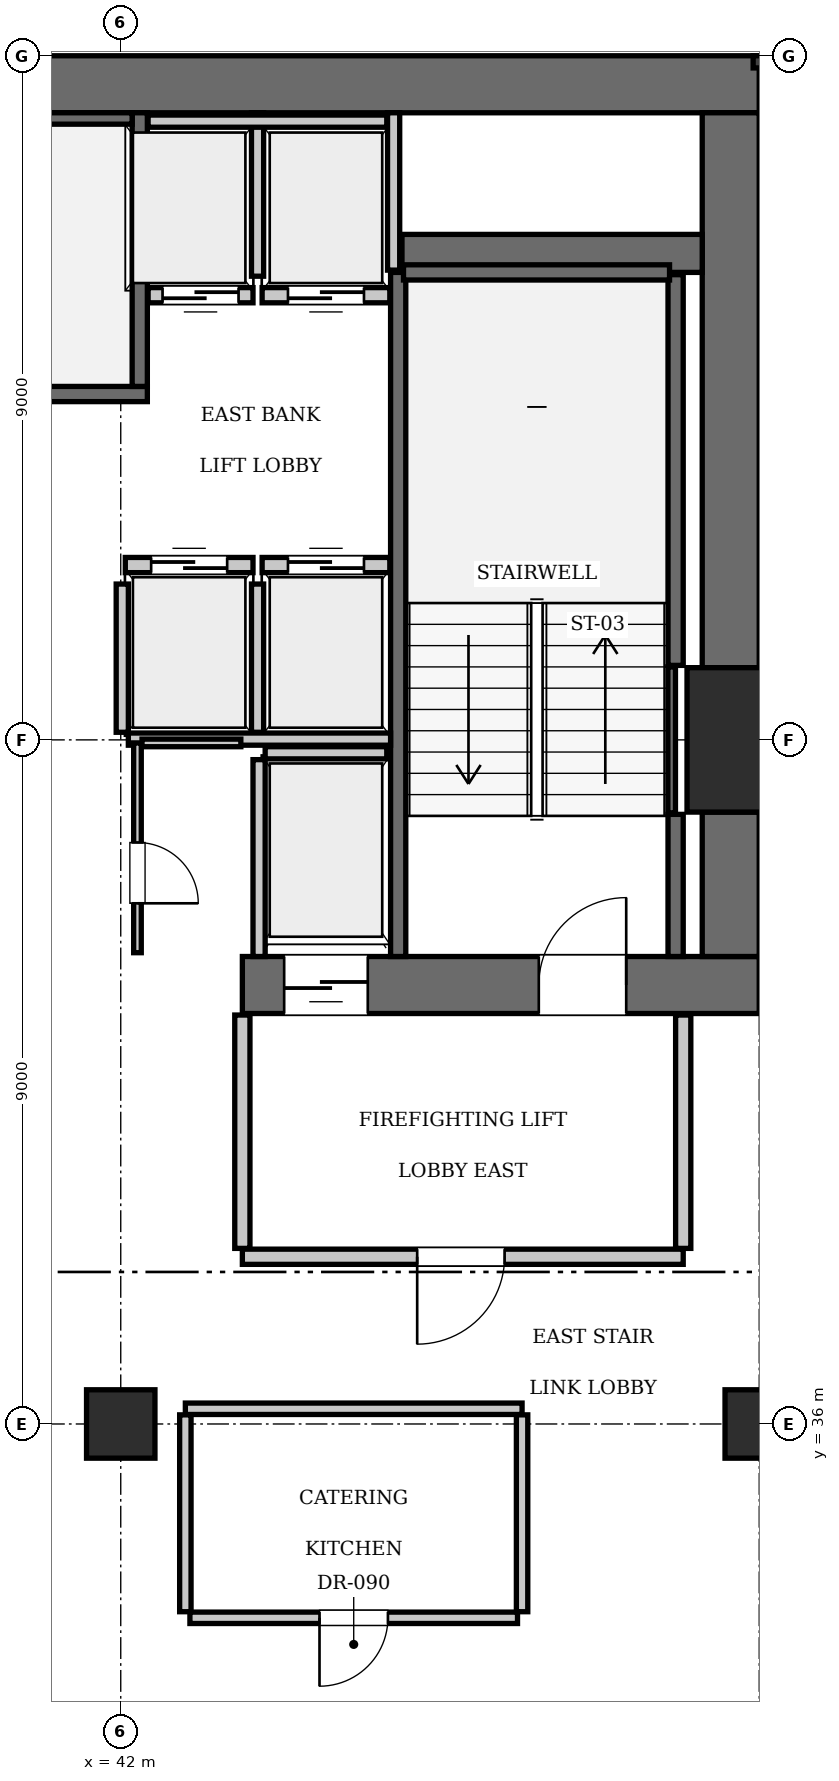
"""IFC4 building model, lengths in metres.
Left out: names, types, materials, properties, quantities, classifications, styles, units other than length and angle.
Written with IfcOpenShell. Run it as: python <this file> out.ifc"""

import sys

from ifc_helpers import new_model, si_unit, direction, frame, frame_2d, origin, origin_2d, place, context, subcontext, project, spatial, rectangle, extrude, element, fill, save


model = new_model("IFC4")
c1 = context("Model", 3, precision=1e-05, world=origin(), true_north=direction((0.0, 1.0)))
c2 = subcontext(c1, "Body", "Model", "MODEL_VIEW")
j1 = project(units=[si_unit("LENGTHUNIT", "METRE"), si_unit("PLANEANGLEUNIT", "RADIAN")], contexts=[c1])
p1 = place(None, origin())
s1 = spatial("IfcSite", under=j1, at=p1, CompositionType="ELEMENT")
p2 = place(p1, origin())
s2 = spatial("IfcBuilding", under=s1, at=p2, CompositionType="ELEMENT")
p3 = place(p2, frame((0.0, 0.0, 215.95)))
s3 = spatial("IfcBuildingStorey", under=s2, at=p3, CompositionType="ELEMENT", Elevation=215.95)
p4 = place(p3, frame((50.4, 45.0, 0.0), z_axis=(0.0, 0.0, 1.0), x_axis=(1.0, 0.0, 0.0)))
e1 = element("IfcColumn", 1, at=p4, inside=s3, PredefinedType="COLUMN", context=c2, shape_type="SweptSolid", body=[
    extrude(rectangle(XDim=1.9, YDim=1.9, at=origin_2d()), origin(), (0.0, 0.0, 1.0), 3.85),
])
p5 = place(p3, frame((25.2, 53.625, 0.0), z_axis=(0.0, 0.0, 1.0), x_axis=(1.0, 0.0, 0.0)))
e2 = element("IfcWall", 2, at=p5, inside=s3, PredefinedType="SHEAR", context=c2, shape_type="SweptSolid", body=[
    extrude(rectangle(XDim=25.2, YDim=0.75, at=frame_2d((12.6, 0.0))), origin(), (0.0, 0.0, 1.0), 3.85),
])
p6 = place(p3, frame((43.6, 41.775, 0.0), z_axis=(0.0, 0.0, 1.0), x_axis=(1.0, 0.0, 0.0)))
e3 = element("IfcWall", 3, at=p6, inside=s3, PredefinedType="SHEAR", context=c2, shape_type="SweptSolid", body=[
    extrude(rectangle(XDim=6.8, YDim=0.75, at=frame_2d((3.4, 0.0))), origin(), (0.0, 0.0, 1.0), 3.85),
])
p7 = place(p6, frame((3.9, 0.0, 0.0)))
e4 = element("IfcOpeningElement", 4, at=p7, cuts=e3, PredefinedType="OPENING", context=c2, shape_type="SweptSolid", body=[
    extrude(rectangle(XDim=1.15, YDim=2.15, at=frame_2d((0.575, 1.075))), frame((0.0, 0.385, 0.0), z_axis=(0.0, -1.0, 0.0), x_axis=(1.0, 0.0, 0.0)), (0.0, 0.0, 1.0), 0.77),
])
p8 = place(p6, frame((0.55, 0.0, 0.0)))
e5 = element("IfcOpeningElement", 5, at=p8, cuts=e3, PredefinedType="OPENING", context=c2, shape_type="SweptSolid", body=[
    extrude(rectangle(XDim=1.1, YDim=2.2, at=frame_2d((0.55, 1.1))), frame((0.0, 0.385, 0.0), z_axis=(0.0, -1.0, 0.0), x_axis=(1.0, 0.0, 0.0)), (0.0, 0.0, 1.0), 0.77),
])
p9 = place(p3, frame((50.025, 42.15, 0.0), z_axis=(0.0, 0.0, 1.0), x_axis=(0.0, 1.0, 0.0)))
e6 = element("IfcWall", 6, at=p9, inside=s3, PredefinedType="SHEAR", context=c2, shape_type="SweptSolid", body=[
    extrude(rectangle(XDim=1.9, YDim=0.75, at=frame_2d((0.95, 0.0))), origin(), (0.0, 0.0, 1.0), 3.85),
])
p10 = place(p3, frame((50.025, 45.95, 0.0), z_axis=(0.0, 0.0, 1.0), x_axis=(0.0, 1.0, 0.0)))
e7 = element("IfcWall", 7, at=p10, inside=s3, PredefinedType="SHEAR", context=c2, shape_type="SweptSolid", body=[
    extrude(rectangle(XDim=7.3, YDim=0.75, at=frame_2d((3.65, 0.0))), origin(), (0.0, 0.0, 1.0), 3.85),
])
p11 = place(p3, frame((45.7, 51.4, 0.0), z_axis=(0.0, 0.0, 1.0), x_axis=(1.0, 0.0, 0.0)))
e8 = element("IfcWall", 8, at=p11, inside=s3, PredefinedType="SHEAR", context=c2, shape_type="SweptSolid", body=[
    extrude(rectangle(XDim=3.95, YDim=0.5, at=frame_2d((1.975, 0.0))), origin(), (0.0, 0.0, 1.0), 3.85),
])
for number, where, z_axis, x_axis in (
    (9, (42.0, 36.0, 0.0), (0.0, 0.0, 1.0), (1.0, 0.0, 0.0)),
    (10, (50.4, 36.0, 0.0), (0.0, 0.0, 1.0), (1.0, 0.0, 0.0)),
):
    element("IfcColumn", number, at=place(p3, frame(where, z_axis=z_axis, x_axis=x_axis)), inside=s3, PredefinedType="COLUMN", context=c2, shape_type="SweptSolid", body=[
        extrude(rectangle(XDim=0.9, YDim=0.9, at=origin_2d()), origin(), (0.0, 0.0, 1.0), 3.85),
    ])
p12 = place(p3, frame((33.25, 49.55, 0.0), z_axis=(0.0, 0.0, 1.0), x_axis=(1.0, 0.0, 0.0)))
e11 = element("IfcWall", 11, at=p12, inside=s3, PredefinedType="SOLIDWALL", context=c2, shape_type="SweptSolid", body=[
    extrude(rectangle(XDim=9.1, YDim=0.2, at=frame_2d((4.55, 0.0))), origin(), (0.0, 0.0, 1.0), 3.61),
])
p13 = place(p3, frame((42.25, 49.65, 0.0), z_axis=(0.0, 0.0, 1.0), x_axis=(0.0, 1.0, 0.0)))
e12 = element("IfcWall", 12, at=p13, inside=s3, PredefinedType="SOLIDWALL", context=c2, shape_type="SweptSolid", body=[
    extrude(rectangle(XDim=3.6, YDim=0.2, at=frame_2d((1.8, 0.0))), origin(), (0.0, 0.0, 1.0), 3.61),
])
p14 = place(p3, frame((33.45, 53.175, 0.0), z_axis=(0.0, 0.0, 1.0), x_axis=(1.0, 0.0, 0.0)))
e13 = element("IfcWall", 13, at=p14, inside=s3, PredefinedType="SOLIDWALL", context=c2, shape_type="SweptSolid", body=[
    extrude(rectangle(XDim=8.7, YDim=0.15, at=frame_2d((4.35, 0.0))), origin(), (0.0, 0.0, 1.0), 3.61),
])
p15 = place(p3, frame((45.65, 42.15, 0.0), z_axis=(0.0, 0.0, 1.0), x_axis=(0.0, 1.0, 0.0)))
e14 = element("IfcWall", 14, at=p15, inside=s3, PredefinedType="SOLIDWALL", context=c2, shape_type="SweptSolid", body=[
    extrude(rectangle(XDim=9.0, YDim=0.2, at=frame_2d((4.5, 0.0))), origin(), (0.0, 0.0, 1.0), 3.61),
])
p16 = place(p3, frame((49.3, 42.15, 0.0), z_axis=(0.0, 0.0, 1.0), x_axis=(0.0, 1.0, 0.0)))
e15 = element("IfcWall", 15, at=p16, inside=s3, PredefinedType="SOLIDWALL", context=c2, shape_type="SweptSolid", body=[
    extrude(rectangle(XDim=1.87, YDim=0.2, at=frame_2d((0.935, 0.0))), origin(), (0.0, 0.0, 1.0), 3.61),
])
p17 = place(p3, frame((49.3, 45.98, 0.0), z_axis=(0.0, 0.0, 1.0), x_axis=(0.0, 1.0, 0.0)))
e16 = element("IfcWall", 16, at=p17, inside=s3, PredefinedType="SOLIDWALL", context=c2, shape_type="SweptSolid", body=[
    extrude(rectangle(XDim=5.14, YDim=0.2, at=frame_2d((2.57, 0.0))), origin(), (0.0, 0.0, 1.0), 3.61),
])
p18 = place(p3, frame((45.72, 51.15, 0.0), z_axis=(0.0, 0.0, 1.0), x_axis=(1.0, 0.0, 0.0)))
e17 = element("IfcWall", 17, at=p18, inside=s3, PredefinedType="SOLIDWALL", context=c2, shape_type="SweptSolid", body=[
    extrude(rectangle(XDim=3.5, YDim=0.2, at=frame_2d((1.75, 0.0))), origin(), (0.0, 0.0, 1.0), 3.61),
])
p19 = place(p3, frame((49.248, 44.04, 0.0), z_axis=(0.0, 0.0, 1.0), x_axis=(0.0, 1.0, 0.0)))
e18 = element("IfcWall", 18, at=p19, inside=s3, PredefinedType="SOLIDWALL", context=c2, shape_type="SweptSolid", body=[
    extrude(rectangle(XDim=1.92, YDim=0.1, at=frame_2d((0.96, 0.0))), origin(), (0.0, 0.0, 1.0), 3.61),
])
p20 = place(p3, frame((42.06, 47.3, 0.0), z_axis=(0.0, 0.0, 1.0), x_axis=(1.0, 0.0, 0.0)))
e19 = element("IfcWall", 19, at=p20, inside=s3, PredefinedType="SOLIDWALL", context=c2, shape_type="SweptSolid", body=[
    extrude(rectangle(XDim=1.68, YDim=0.2, at=frame_2d((0.84, 0.0))), origin(), (0.0, 0.0, 1.0), 3.61),
])
p21 = place(p20, frame((0.34, 0.0, 0.0)))
e20 = element("IfcOpeningElement", 20, at=p21, cuts=e19, PredefinedType="OPENING", context=c2, shape_type="SweptSolid", body=[
    extrude(rectangle(XDim=1.0, YDim=2.15, at=frame_2d((0.5, 1.075))), frame((0.0, 0.11, 0.0), z_axis=(0.0, -1.0, 0.0), x_axis=(1.0, 0.0, 0.0)), (0.0, 0.0, 1.0), 0.22),
])
p22 = place(p3, frame((43.86, 47.3, 0.0), z_axis=(0.0, 0.0, 1.0), x_axis=(1.0, 0.0, 0.0)))
e21 = element("IfcWall", 21, at=p22, inside=s3, PredefinedType="SOLIDWALL", context=c2, shape_type="SweptSolid", body=[
    extrude(rectangle(XDim=1.68, YDim=0.2, at=frame_2d((0.84, 0.0))), origin(), (0.0, 0.0, 1.0), 3.61),
])
p23 = place(p22, frame((0.34, 0.0, 0.0)))
e22 = element("IfcOpeningElement", 22, at=p23, cuts=e21, PredefinedType="OPENING", context=c2, shape_type="SweptSolid", body=[
    extrude(rectangle(XDim=1.0, YDim=2.15, at=frame_2d((0.5, 1.075))), frame((0.0, 0.11, 0.0), z_axis=(0.0, -1.0, 0.0), x_axis=(1.0, 0.0, 0.0)), (0.0, 0.0, 1.0), 0.22),
])
p24 = place(p3, frame((42.36, 50.85, 0.0), z_axis=(0.0, 0.0, 1.0), x_axis=(1.0, 0.0, 0.0)))
e23 = element("IfcWall", 23, at=p24, inside=s3, PredefinedType="SOLIDWALL", context=c2, shape_type="SweptSolid", body=[
    extrude(rectangle(XDim=1.38, YDim=0.2, at=frame_2d((0.69, 0.0))), origin(), (0.0, 0.0, 1.0), 3.61),
])
p25 = place(p24, frame((0.19, 0.0, 0.0)))
e24 = element("IfcOpeningElement", 24, at=p25, cuts=e23, PredefinedType="OPENING", context=c2, shape_type="SweptSolid", body=[
    extrude(rectangle(XDim=1.0, YDim=2.15, at=frame_2d((0.5, 1.075))), frame((0.0, 0.11, 0.0), z_axis=(0.0, -1.0, 0.0), x_axis=(1.0, 0.0, 0.0)), (0.0, 0.0, 1.0), 0.22),
])
p26 = place(p3, frame((43.86, 50.85, 0.0), z_axis=(0.0, 0.0, 1.0), x_axis=(1.0, 0.0, 0.0)))
e25 = element("IfcWall", 25, at=p26, inside=s3, PredefinedType="SOLIDWALL", context=c2, shape_type="SweptSolid", body=[
    extrude(rectangle(XDim=1.68, YDim=0.2, at=frame_2d((0.84, 0.0))), origin(), (0.0, 0.0, 1.0), 3.61),
])
p27 = place(p26, frame((0.34, 0.0, 0.0)))
e26 = element("IfcOpeningElement", 26, at=p27, cuts=e25, PredefinedType="OPENING", context=c2, shape_type="SweptSolid", body=[
    extrude(rectangle(XDim=1.0, YDim=2.15, at=frame_2d((0.5, 1.075))), frame((0.0, 0.11, 0.0), z_axis=(0.0, -1.0, 0.0), x_axis=(1.0, 0.0, 0.0)), (0.0, 0.0, 1.0), 0.22),
])
p28 = place(p3, frame((43.9, 44.83, 0.0), z_axis=(0.0, 0.0, 1.0), x_axis=(1.0, 0.0, 0.0)))
e27 = element("IfcWall", 27, at=p28, inside=s3, PredefinedType="SOLIDWALL", context=c2, shape_type="SweptSolid", body=[
    extrude(rectangle(XDim=1.6, YDim=0.16, at=frame_2d((0.8, 0.0))), origin(), (0.0, 0.0, 1.0), 3.61),
])
p29 = place(p3, frame((43.82, 42.15, 0.0), z_axis=(0.0, 0.0, 1.0), x_axis=(0.0, 1.0, 0.0)))
e28 = element("IfcWall", 28, at=p29, inside=s3, PredefinedType="SOLIDWALL", context=c2, shape_type="SweptSolid", body=[
    extrude(rectangle(XDim=2.59, YDim=0.16, at=frame_2d((1.295, 0.0))), origin(), (0.0, 0.0, 1.0), 3.61),
])
for number, where, z_axis, x_axis in (
    (29, (42.02, 45.1, 0.0), (0.0, 0.0, 1.0), (0.0, 1.0, 0.0)),
    (30, (43.8, 45.1, 0.0), (0.0, 0.0, 1.0), (0.0, 1.0, 0.0)),
):
    element("IfcWall", number, at=place(p3, frame(where, z_axis=z_axis, x_axis=x_axis)), inside=s3, PredefinedType="SOLIDWALL", context=c2, shape_type="SweptSolid", body=[
        extrude(rectangle(XDim=1.95, YDim=0.16, at=frame_2d((0.975, 0.0))), origin(), (0.0, 0.0, 1.0), 3.61),
    ])
p30 = place(p3, frame((42.1, 45.01, 0.0), z_axis=(0.0, 0.0, 1.0), x_axis=(1.0, 0.0, 0.0)))
e31 = element("IfcWall", 31, at=p30, inside=s3, PredefinedType="SOLIDWALL", context=c2, shape_type="SweptSolid", body=[
    extrude(rectangle(XDim=3.45, YDim=0.16, at=frame_2d((1.725, 0.0))), origin(), (0.0, 0.0, 1.0), 3.61),
])
p31 = place(p3, frame((45.59, 51.18, 0.0), z_axis=(0.0, 0.0, 1.0), x_axis=(0.0, 1.0, 0.0)))
e32 = element("IfcWall", 32, at=p31, inside=s3, PredefinedType="SOLIDWALL", context=c2, shape_type="SweptSolid", body=[
    extrude(rectangle(XDim=2.07, YDim=0.16, at=frame_2d((1.035, 0.0))), origin(), (0.0, 0.0, 1.0), 3.61),
])
p32 = place(p3, frame((43.8, 51.1, 0.0), z_axis=(0.0, 0.0, 1.0), x_axis=(0.0, 1.0, 0.0)))
e33 = element("IfcWall", 33, at=p32, inside=s3, PredefinedType="SOLIDWALL", context=c2, shape_type="SweptSolid", body=[
    extrude(rectangle(XDim=2.15, YDim=0.16, at=frame_2d((1.075, 0.0))), origin(), (0.0, 0.0, 1.0), 3.61),
])
p33 = place(p3, frame((42.36, 53.14, 0.0), z_axis=(0.0, 0.0, 1.0), x_axis=(1.0, 0.0, 0.0)))
e34 = element("IfcWall", 34, at=p33, inside=s3, PredefinedType="SOLIDWALL", context=c2, shape_type="SweptSolid", body=[
    extrude(rectangle(XDim=3.14, YDim=0.16, at=frame_2d((1.57, 0.0))), origin(), (0.0, 0.0, 1.0), 3.61),
])
p34 = place(p3, frame((43.6, 38.2, 0.0), z_axis=(0.0, 0.0, 1.0), x_axis=(1.0, 0.0, 0.0)))
e35 = element("IfcWall", 35, at=p34, inside=s3, PredefinedType="PARTITIONING", context=c2, shape_type="SweptSolid", body=[
    extrude(rectangle(XDim=5.8, YDim=0.2, at=frame_2d((2.9, 0.0))), origin(), (0.0, 0.0, 1.0), 3.61),
])
p35 = place(p34, frame((2.3, 0.0, 0.0)))
e36 = element("IfcOpeningElement", 36, at=p35, cuts=e35, PredefinedType="OPENING", context=c2, shape_type="SweptSolid", body=[
    extrude(rectangle(XDim=1.15, YDim=2.15, at=frame_2d((0.575, 1.075))), frame((0.0, 0.11, 0.0), z_axis=(0.0, -1.0, 0.0), x_axis=(1.0, 0.0, 0.0)), (0.0, 0.0, 1.0), 0.22),
])
for number, where, z_axis, x_axis in (
    (37, (43.6, 38.31, 0.0), (0.0, 0.0, 1.0), (0.0, 1.0, 0.0)),
    (38, (49.4, 38.31, 0.0), (0.0, 0.0, 1.0), (0.0, 1.0, 0.0)),
):
    element("IfcWall", number, at=place(p3, frame(where, z_axis=z_axis, x_axis=x_axis)), inside=s3, PredefinedType="PARTITIONING", context=c2, shape_type="SweptSolid", body=[
        extrude(rectangle(XDim=3.07, YDim=0.2, at=frame_2d((1.535, 0.0))), origin(), (0.0, 0.0, 1.0), 3.61),
    ])
p36 = place(p3, frame((42.22, 42.2, 0.0), z_axis=(0.0, 0.0, 1.0), x_axis=(0.0, 1.0, 0.0)))
e39 = element("IfcWall", 39, at=p36, inside=s3, PredefinedType="PARTITIONING", context=c2, shape_type="SweptSolid", body=[
    extrude(rectangle(XDim=2.76, YDim=0.1, at=frame_2d((1.38, 0.0))), origin(), (0.0, 0.0, 1.0), 3.61),
])
p37 = place(p36, frame((0.65, 0.0, 0.0)))
e40 = element("IfcOpeningElement", 40, at=p37, cuts=e39, PredefinedType="OPENING", context=c2, shape_type="SweptSolid", body=[
    extrude(rectangle(XDim=0.8, YDim=2.05, at=frame_2d((0.4, 1.025))), frame((0.0, 0.06, 0.0), z_axis=(0.0, -1.0, 0.0), x_axis=(1.0, 0.0, 0.0)), (0.0, 0.0, 1.0), 0.12),
])
p38 = place(p3, frame((42.28, 44.96, 0.0), z_axis=(0.0, 0.0, 1.0), x_axis=(1.0, 0.0, 0.0)))
e41 = element("IfcWall", 41, at=p38, inside=s3, PredefinedType="PARTITIONING", context=c2, shape_type="SweptSolid", body=[
    extrude(rectangle(XDim=1.3, YDim=0.1, at=frame_2d((0.65, 0.0))), origin(), (0.0, 0.0, 1.0), 3.61),
])
p39 = place(p3, frame((42.85, 36.2, 0.0), z_axis=(0.0, 0.0, 1.0), x_axis=(1.0, 0.0, 0.0)))
e42 = element("IfcWall", 42, at=p39, inside=s3, PredefinedType="PARTITIONING", context=c2, shape_type="SweptSolid", body=[
    extrude(rectangle(XDim=4.43, YDim=0.15, at=frame_2d((2.215, 0.0))), origin(), (0.0, 0.0, 1.0), 3.61),
])
for number, where, z_axis, x_axis in (
    (43, (42.85, 33.53, 0.0), (0.0, 0.0, 1.0), (0.0, 1.0, 0.0)),
    (44, (47.28, 33.53, 0.0), (0.0, 0.0, 1.0), (0.0, 1.0, 0.0)),
):
    element("IfcWall", number, at=place(p3, frame(where, z_axis=z_axis, x_axis=x_axis)), inside=s3, PredefinedType="PARTITIONING", context=c2, shape_type="SweptSolid", body=[
        extrude(rectangle(XDim=2.59, YDim=0.15, at=frame_2d((1.295, 0.0))), origin(), (0.0, 0.0, 1.0), 3.61),
    ])
p40 = place(p3, frame((42.91, 33.45, 0.0), z_axis=(0.0, 0.0, 1.0), x_axis=(1.0, 0.0, 0.0)))
e45 = element("IfcWall", 45, at=p40, inside=s3, PredefinedType="PARTITIONING", context=c2, shape_type="SweptSolid", body=[
    extrude(rectangle(XDim=4.31, YDim=0.15, at=frame_2d((2.155, 0.0))), origin(), (0.0, 0.0, 1.0), 3.61),
])
p41 = place(p40, frame((1.705, 0.0, 0.0)))
e46 = element("IfcOpeningElement", 46, at=p41, cuts=e45, PredefinedType="OPENING", context=c2, shape_type="SweptSolid", body=[
    extrude(rectangle(XDim=0.9, YDim=2.1, at=frame_2d((0.45, 1.05))), frame((0.0, 0.085, 0.0), z_axis=(0.0, -1.0, 0.0), x_axis=(1.0, 0.0, 0.0)), (0.0, 0.0, 1.0), 0.17),
])
p42 = place(p7, origin())
e47 = element("IfcDoor", 47, at=p42, inside=s3, OperationType="SINGLE_SWING_RIGHT", PredefinedType="DOOR", context=c2, shape_type="SweptSolid", body=[
    extrude(rectangle(XDim=1.15, YDim=2.15, at=frame_2d((0.575, 1.075))), frame((0.0, 0.025, 0.0), z_axis=(0.0, -1.0, 0.0), x_axis=(1.0, 0.0, 0.0)), (0.0, 0.0, 1.0), 0.05),
])
fill(e4, e47)
p43 = place(p21, origin())
e48 = element("IfcDoor", 48, at=p43, inside=s3, OperationType="SLIDING_TO_LEFT", PredefinedType="DOOR", context=c2, shape_type="SweptSolid", body=[
    extrude(rectangle(XDim=1.0, YDim=2.15, at=frame_2d((0.5, 1.075))), frame((0.0, 0.025, 0.0), z_axis=(0.0, -1.0, 0.0), x_axis=(1.0, 0.0, 0.0)), (0.0, 0.0, 1.0), 0.05),
])
fill(e20, e48)
p44 = place(p23, origin())
e49 = element("IfcDoor", 49, at=p44, inside=s3, OperationType="SLIDING_TO_LEFT", PredefinedType="DOOR", context=c2, shape_type="SweptSolid", body=[
    extrude(rectangle(XDim=1.0, YDim=2.15, at=frame_2d((0.5, 1.075))), frame((0.0, 0.025, 0.0), z_axis=(0.0, -1.0, 0.0), x_axis=(1.0, 0.0, 0.0)), (0.0, 0.0, 1.0), 0.05),
])
fill(e22, e49)
p45 = place(p25, frame((1.0, 0.0, 0.0), z_axis=(0.0, 0.0, 1.0), x_axis=(-1.0, 0.0, 0.0)))
e50 = element("IfcDoor", 50, at=p45, inside=s3, OperationType="SLIDING_TO_LEFT", PredefinedType="DOOR", context=c2, shape_type="SweptSolid", body=[
    extrude(rectangle(XDim=1.0, YDim=2.15, at=frame_2d((0.5, 1.075))), frame((0.0, 0.025, 0.0), z_axis=(0.0, -1.0, 0.0), x_axis=(1.0, 0.0, 0.0)), (0.0, 0.0, 1.0), 0.05),
])
fill(e24, e50)
p46 = place(p27, frame((1.0, 0.0, 0.0), z_axis=(0.0, 0.0, 1.0), x_axis=(-1.0, 0.0, 0.0)))
e51 = element("IfcDoor", 51, at=p46, inside=s3, OperationType="SLIDING_TO_LEFT", PredefinedType="DOOR", context=c2, shape_type="SweptSolid", body=[
    extrude(rectangle(XDim=1.0, YDim=2.15, at=frame_2d((0.5, 1.075))), frame((0.0, 0.025, 0.0), z_axis=(0.0, -1.0, 0.0), x_axis=(1.0, 0.0, 0.0)), (0.0, 0.0, 1.0), 0.05),
])
fill(e26, e51)
p47 = place(p8, frame((1.1, 0.0, 0.0), z_axis=(0.0, 0.0, 1.0), x_axis=(-1.0, 0.0, 0.0)))
e52 = element("IfcDoor", 52, at=p47, inside=s3, OperationType="SLIDING_TO_LEFT", PredefinedType="DOOR", context=c2, shape_type="SweptSolid", body=[
    extrude(rectangle(XDim=1.1, YDim=2.2, at=frame_2d((0.55, 1.1))), frame((0.0, 0.025, 0.0), z_axis=(0.0, -1.0, 0.0), x_axis=(1.0, 0.0, 0.0)), (0.0, 0.0, 1.0), 0.05),
])
fill(e5, e52)
p48 = place(p35, frame((1.15, 0.0, 0.0), z_axis=(0.0, 0.0, 1.0), x_axis=(-1.0, 0.0, 0.0)))
e53 = element("IfcDoor", 53, at=p48, inside=s3, OperationType="SINGLE_SWING_RIGHT", PredefinedType="DOOR", context=c2, shape_type="SweptSolid", body=[
    extrude(rectangle(XDim=1.15, YDim=2.15, at=frame_2d((0.575, 1.075))), frame((0.0, 0.025, 0.0), z_axis=(0.0, -1.0, 0.0), x_axis=(1.0, 0.0, 0.0)), (0.0, 0.0, 1.0), 0.05),
])
fill(e36, e53)
p49 = place(p37, frame((0.8, 0.0, 0.0), z_axis=(0.0, 0.0, 1.0), x_axis=(-1.0, 0.0, 0.0)))
e54 = element("IfcDoor", 54, at=p49, inside=s3, OperationType="SINGLE_SWING_RIGHT", PredefinedType="DOOR", context=c2, shape_type="SweptSolid", body=[
    extrude(rectangle(XDim=0.8, YDim=2.05, at=frame_2d((0.4, 1.025))), frame((0.0, 0.025, 0.0), z_axis=(0.0, -1.0, 0.0), x_axis=(1.0, 0.0, 0.0)), (0.0, 0.0, 1.0), 0.05),
])
fill(e40, e54)
p50 = place(p41, frame((0.9, 0.0, 0.0), z_axis=(0.0, 0.0, 1.0), x_axis=(-1.0, 0.0, 0.0)))
e55 = element("IfcDoor", 55, at=p50, inside=s3, OperationType="SINGLE_SWING_RIGHT", PredefinedType="DOOR", context=c2, shape_type="SweptSolid", body=[
    extrude(rectangle(XDim=0.9, YDim=2.1, at=frame_2d((0.45, 1.05))), frame((0.0, 0.025, 0.0), z_axis=(0.0, -1.0, 0.0), x_axis=(1.0, 0.0, 0.0)), (0.0, 0.0, 1.0), 0.05),
])
fill(e46, e55)
save(model, sys.argv[1])
